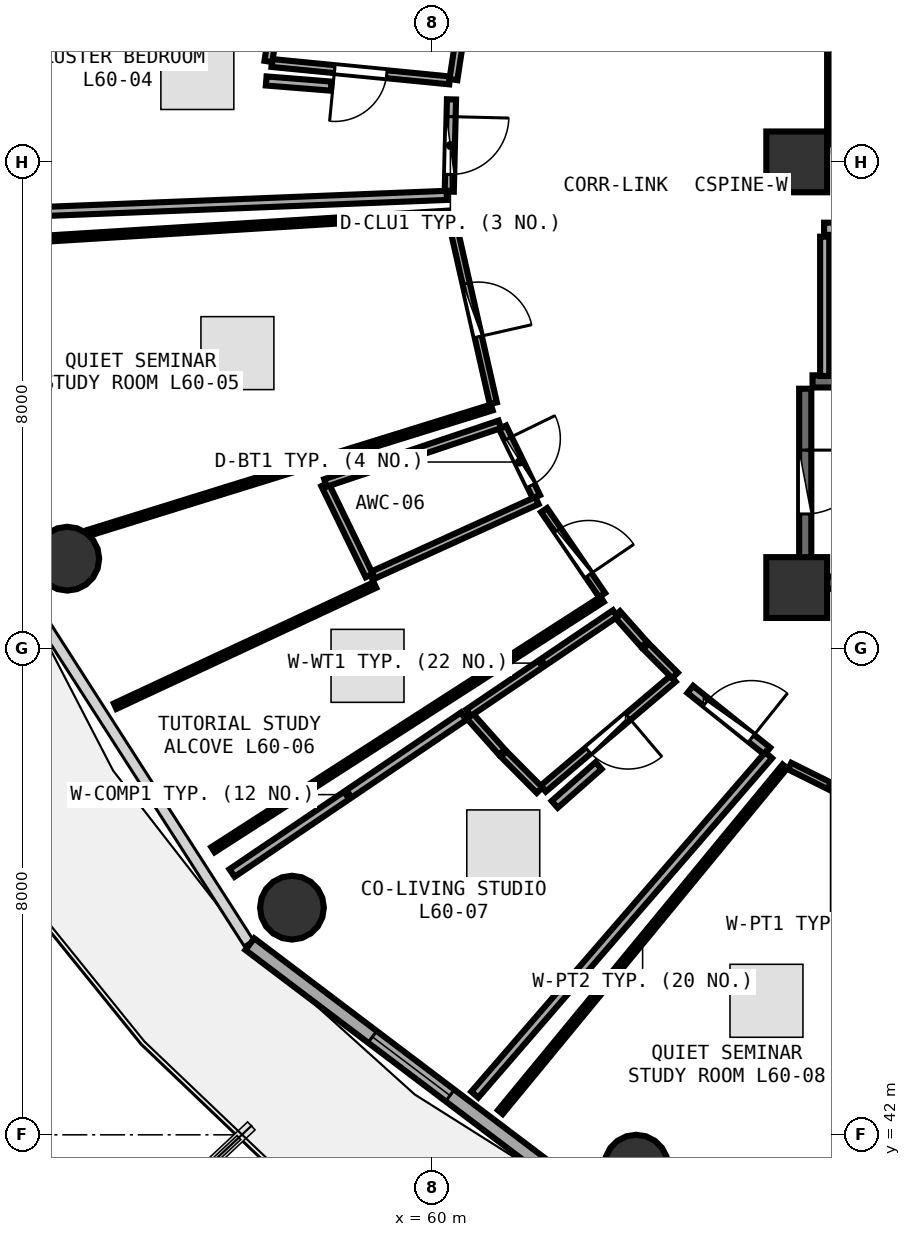
"""IFC4 building model, lengths in metres.
Left out: names, types, materials, properties, quantities, classifications, styles, units other than length and angle.
Written with IfcOpenShell. Run it as: python <this file> out.ifc"""

import sys

from ifc_helpers import new_model, si_unit, direction, frame, frame_2d, origin, origin_2d, place, context, subcontext, project, spatial, rectangle, circle, extrude, element, fill, save


model = new_model("IFC4")
c1 = context("Model", 3, precision=1e-05, world=origin(), true_north=direction((0.0, 1.0)))
c2 = subcontext(c1, "Body", "Model", "MODEL_VIEW")
j1 = project(units=[si_unit("LENGTHUNIT", "METRE"), si_unit("PLANEANGLEUNIT", "RADIAN")], contexts=[c1])
p1 = place(None, origin())
s1 = spatial("IfcSite", under=j1, at=p1, CompositionType="ELEMENT")
p2 = place(p1, origin())
s2 = spatial("IfcBuilding", under=s1, at=p2, CompositionType="ELEMENT")
p3 = place(p2, frame((0.0, 0.0, 234.45)))
s3 = spatial("IfcBuildingStorey", under=s2, at=p3, CompositionType="ELEMENT", Elevation=234.45)
for number, where, z_axis, x_axis in (
    (1, (66.0, 51.0, 0.0), (0.0, 0.0, 1.0), (1.0, 0.0, 0.0)),
    (2, (66.0, 58.0, 0.0), (0.0, 0.0, 1.0), (1.0, 0.0, 0.0)),
):
    element("IfcColumn", number, at=place(p3, frame(where, z_axis=z_axis, x_axis=x_axis)), inside=s3, PredefinedType="PILASTER", context=c2, shape_type="SweptSolid", body=[
        extrude(rectangle(XDim=1.0, YDim=1.0, at=origin_2d()), origin(), (0.0, 0.0, 1.0), 3.75),
    ])
for number, where, z_axis, x_axis in (
    (3, (54.003, 51.474, 0.0), (0.0, 0.0, 1.0), (1.0, 0.0, 0.0)),
    (4, (57.698, 45.736, 0.0), (0.0, 0.0, 1.0), (1.0, 0.0, 0.0)),
    (5, (63.36, 41.476, 0.0), (0.0, 0.0, 1.0), (1.0, 0.0, 0.0)),
):
    element("IfcColumn", number, at=place(p3, frame(where, z_axis=z_axis, x_axis=x_axis)), inside=s3, PredefinedType="COLUMN", context=c2, shape_type="SweptSolid", body=[
        extrude(circle(Radius=0.525, at=origin_2d()), origin(), (0.0, 0.0, 1.0), 3.75),
    ])
p4 = place(p3, frame((57.006, 45.135, 0.0), z_axis=(0.0, 0.0, 1.0), x_axis=(0.797701674595, -0.603052268338, 0.0)))
e6 = element("IfcWall", 6, at=p4, inside=s3, PredefinedType="SOLIDWALL", context=c2, shape_type="SweptSolid", body=[
    extrude(rectangle(XDim=7.374, YDim=0.24, at=frame_2d((3.687, 0.0))), origin(), (0.0, 0.0, 1.0), 3.475),
])
p5 = place(p4, frame((2.527, 0.0, 0.85)))
e7 = element("IfcOpeningElement", 7, at=p5, cuts=e6, PredefinedType="OPENING", context=c2, shape_type="SweptSolid", body=[
    extrude(rectangle(XDim=1.6, YDim=1.45, at=frame_2d((0.8, 0.725))), frame((0.0, 0.13, 0.0), z_axis=(0.0, -1.0, 0.0), x_axis=(1.0, 0.0, 0.0)), (0.0, 0.0, 1.0), 0.26),
])
for number, where, z_axis, x_axis in (
    (8, (66.26, 51.08, 0.0), (0.0, 0.0, 1.0), (1.0, 0.0, 0.0)),
    (9, (73.42, 54.39, 0.0), (0.0, 0.0, 1.0), (-1.0, 0.0, 0.0)),
):
    element("IfcWall", number, at=place(p3, frame(where, z_axis=z_axis, x_axis=x_axis)), inside=s3, PredefinedType="SHEAR", context=c2, shape_type="SweptSolid", body=[
        extrude(rectangle(XDim=7.16, YDim=0.2, at=frame_2d((3.58, 0.0))), origin(), (0.0, 0.0, 1.0), 3.49),
    ])
p6 = place(p3, frame((66.14, 54.27, 0.0), z_axis=(0.0, 0.0, 1.0), x_axis=(0.0, -1.0, 0.0)))
e10 = element("IfcWall", 10, at=p6, inside=s3, PredefinedType="SHEAR", context=c2, shape_type="SweptSolid", body=[
    extrude(rectangle(XDim=3.07, YDim=0.2, at=frame_2d((1.535, 0.0))), origin(), (0.0, 0.0, 1.0), 3.49),
])
p7 = place(p6, frame((1.01, 0.0, 0.0)))
e11 = element("IfcOpeningElement", 11, at=p7, cuts=e10, PredefinedType="OPENING", context=c2, shape_type="SweptSolid", body=[
    extrude(rectangle(XDim=1.05, YDim=2.1, at=frame_2d((0.525, 1.05))), frame((0.0, 0.11, 0.0), z_axis=(0.0, -1.0, 0.0), x_axis=(1.0, 0.0, 0.0)), (0.0, 0.0, 1.0), 0.22),
])
p8 = place(p3, frame((66.45, 56.9, 0.0), z_axis=(0.0, 0.0, 1.0), x_axis=(1.0, 0.0, 0.0)))
e12 = element("IfcWall", 12, at=p8, inside=s3, PredefinedType="SOLIDWALL", context=c2, shape_type="SweptSolid", body=[
    extrude(rectangle(XDim=14.4, YDim=0.2, at=frame_2d((7.2, 0.0))), origin(), (0.0, 0.0, 1.0), 3.48),
])
p9 = place(p8, frame((0.4, 0.0, 0.0)))
e13 = element("IfcOpeningElement", 13, at=p9, cuts=e12, PredefinedType="OPENING", context=c2, shape_type="SweptSolid", body=[
    extrude(rectangle(XDim=1.1, YDim=2.1, at=frame_2d((0.55, 1.05))), frame((0.0, 0.11, 0.0), z_axis=(0.0, -1.0, 0.0), x_axis=(1.0, 0.0, 0.0)), (0.0, 0.0, 1.0), 0.22),
])
p10 = place(p8, frame((2.4, 0.0, 0.0)))
e14 = element("IfcOpeningElement", 14, at=p10, cuts=e12, PredefinedType="OPENING", context=c2, shape_type="SweptSolid", body=[
    extrude(rectangle(XDim=1.1, YDim=2.1, at=frame_2d((0.55, 1.05))), frame((0.0, 0.11, 0.0), z_axis=(0.0, -1.0, 0.0), x_axis=(1.0, 0.0, 0.0)), (0.0, 0.0, 1.0), 0.22),
])
p11 = place(p8, frame((4.4, 0.0, 0.0)))
e15 = element("IfcOpeningElement", 15, at=p11, cuts=e12, PredefinedType="OPENING", context=c2, shape_type="SweptSolid", body=[
    extrude(rectangle(XDim=1.1, YDim=2.1, at=frame_2d((0.55, 1.05))), frame((0.0, 0.11, 0.0), z_axis=(0.0, -1.0, 0.0), x_axis=(1.0, 0.0, 0.0)), (0.0, 0.0, 1.0), 0.22),
])
p12 = place(p3, frame((66.46, 54.48, 0.0), z_axis=(0.0, 0.0, 1.0), x_axis=(0.0, 1.0, 0.0)))
e16 = element("IfcWall", 16, at=p12, inside=s3, PredefinedType="PARTITIONING", context=c2, shape_type="SweptSolid", body=[
    extrude(rectangle(XDim=2.29, YDim=0.15, at=frame_2d((1.145, 0.0))), origin(), (0.0, 0.0, 1.0), 3.48),
])
p13 = place(p3, frame((60.291, 59.34, 0.0), z_axis=(0.0, 0.0, 1.0), x_axis=(-0.995236750248, 0.097487491277, 0.0)))
e17 = element("IfcWall", 17, at=p13, inside=s3, PredefinedType="PLUMBINGWALL", context=c2, shape_type="SweptSolid", body=[
    extrude(rectangle(XDim=2.938, YDim=0.13, at=frame_2d((1.469, 0.0))), origin(), (0.0, 0.0, 1.0), 3.175),
])
p14 = place(p13, frame((1.039, 0.0, 0.0)))
e18 = element("IfcOpeningElement", 18, at=p14, cuts=e17, PredefinedType="OPENING", context=c2, shape_type="SweptSolid", body=[
    extrude(rectangle(XDim=0.86, YDim=2.05, at=frame_2d((0.43, 1.025))), frame((0.0, 0.075, 0.0), z_axis=(0.0, -1.0, 0.0), x_axis=(1.0, 0.0, 0.0)), (0.0, 0.0, 1.0), 0.15),
])
p15 = place(p3, frame((60.323, 59.028, 0.0), z_axis=(0.0, 0.0, 1.0), x_axis=(-0.024453580127, -0.999700966499, 0.0)))
e19 = element("IfcWall", 19, at=p15, inside=s3, PredefinedType="PARTITIONING", context=c2, shape_type="SweptSolid", body=[
    extrude(rectangle(XDim=1.518, YDim=0.15, at=frame_2d((0.759, 0.0))), origin(), (0.0, 0.0, 1.0), 3.025),
])
p16 = place(p15, frame((0.284, 0.0, 0.0)))
e20 = element("IfcOpeningElement", 20, at=p16, cuts=e19, PredefinedType="OPENING", context=c2, shape_type="SweptSolid", body=[
    extrude(rectangle(XDim=0.95, YDim=2.08, at=frame_2d((0.475, 1.04))), frame((0.0, 0.085, 0.0), z_axis=(0.0, -1.0, 0.0), x_axis=(1.0, 0.0, 0.0)), (0.0, 0.0, 1.0), 0.17),
])
p17 = place(p3, frame((60.316, 57.093, 0.0), z_axis=(0.0, 0.0, 1.0), x_axis=(0.22091500264, -0.975293064473, 0.0)))
e21 = element("IfcWall", 21, at=p17, inside=s3, PredefinedType="PARTITIONING", context=c2, shape_type="SweptSolid", body=[
    extrude(rectangle(XDim=3.139, YDim=0.12, at=frame_2d((1.569, 0.0))), origin(), (0.0, 0.0, 1.0), 3.48),
])
p18 = place(p17, frame((1.119, 0.0, 0.0)))
e22 = element("IfcOpeningElement", 22, at=p18, cuts=e21, PredefinedType="OPENING", context=c2, shape_type="SweptSolid", body=[
    extrude(rectangle(XDim=0.9, YDim=2.08, at=frame_2d((0.45, 1.04))), frame((0.0, 0.07, 0.0), z_axis=(0.0, -1.0, 0.0), x_axis=(1.0, 0.0, 0.0)), (0.0, 0.0, 1.0), 0.14),
])
p19 = place(p3, frame((61.162, 53.636, 0.0), z_axis=(0.0, 0.0, 1.0), x_axis=(0.437981349822, -0.898984058373, 0.0)))
e23 = element("IfcWall", 23, at=p19, inside=s3, PredefinedType="PLUMBINGWALL", context=c2, shape_type="SweptSolid", body=[
    extrude(rectangle(XDim=1.273, YDim=0.13, at=frame_2d((0.636, 0.0))), origin(), (0.0, 0.0, 1.0), 3.235),
])
p20 = place(p19, frame((0.206, 0.0, 0.0)))
e24 = element("IfcOpeningElement", 24, at=p20, cuts=e23, PredefinedType="OPENING", context=c2, shape_type="SweptSolid", body=[
    extrude(rectangle(XDim=0.86, YDim=2.05, at=frame_2d((0.43, 1.025))), frame((0.0, 0.075, 0.0), z_axis=(0.0, -1.0, 0.0), x_axis=(1.0, 0.0, 0.0)), (0.0, 0.0, 1.0), 0.15),
])
p21 = place(p3, frame((61.846, 52.273, 0.0), z_axis=(0.0, 0.0, 1.0), x_axis=(0.563860796601, -0.825869845712, 0.0)))
e25 = element("IfcWall", 25, at=p21, inside=s3, PredefinedType="PARTITIONING", context=c2, shape_type="SweptSolid", body=[
    extrude(rectangle(XDim=1.691, YDim=0.12, at=frame_2d((0.846, 0.0))), origin(), (0.0, 0.0, 1.0), 3.025),
])
p22 = place(p21, frame((0.396, 0.0, 0.0)))
e26 = element("IfcOpeningElement", 26, at=p22, cuts=e25, PredefinedType="OPENING", context=c2, shape_type="SweptSolid", body=[
    extrude(rectangle(XDim=0.9, YDim=2.08, at=frame_2d((0.45, 1.04))), frame((0.0, 0.07, 0.0), z_axis=(0.0, -1.0, 0.0), x_axis=(1.0, 0.0, 0.0)), (0.0, 0.0, 1.0), 0.14),
])
p23 = place(p3, frame((63.966, 49.501, 0.0), z_axis=(0.0, 0.0, 1.0), x_axis=(-0.763141339825, -0.646231611305, 0.0)))
e27 = element("IfcWall", 27, at=p23, inside=s3, PredefinedType="PLUMBINGWALL", context=c2, shape_type="SweptSolid", body=[
    extrude(rectangle(XDim=2.798, YDim=0.13, at=frame_2d((1.399, 0.0))), origin(), (0.0, 0.0, 1.0), 3.025),
])
p24 = place(p23, frame((0.969, 0.0, 0.0)))
e28 = element("IfcOpeningElement", 28, at=p24, cuts=e27, PredefinedType="OPENING", context=c2, shape_type="SweptSolid", body=[
    extrude(rectangle(XDim=0.86, YDim=2.05, at=frame_2d((0.43, 1.025))), frame((0.0, 0.075, 0.0), z_axis=(0.0, -1.0, 0.0), x_axis=(1.0, 0.0, 0.0)), (0.0, 0.0, 1.0), 0.15),
])
p25 = place(p3, frame((64.25, 49.324, 0.0), z_axis=(0.0, 0.0, 1.0), x_axis=(0.780560643324, -0.625080060547, 0.0)))
e29 = element("IfcWall", 29, at=p25, inside=s3, PredefinedType="PARTITIONING", context=c2, shape_type="SweptSolid", body=[
    extrude(rectangle(XDim=1.624, YDim=0.15, at=frame_2d((0.812, 0.0))), origin(), (0.0, 0.0, 1.0), 3.025),
])
p26 = place(p25, frame((0.337, 0.0, 0.0)))
e30 = element("IfcOpeningElement", 30, at=p26, cuts=e29, PredefinedType="OPENING", context=c2, shape_type="SweptSolid", body=[
    extrude(rectangle(XDim=0.95, YDim=2.08, at=frame_2d((0.475, 1.04))), frame((0.0, 0.085, 0.0), z_axis=(0.0, -1.0, 0.0), x_axis=(1.0, 0.0, 0.0)), (0.0, 0.0, 1.0), 0.17),
])
p27 = place(p3, frame((65.885, 48.063, 0.0), z_axis=(0.0, 0.0, 1.0), x_axis=(0.895499293581, -0.445062933973, 0.0)))
e31 = element("IfcWall", 31, at=p27, inside=s3, PredefinedType="PARTITIONING", context=c2, shape_type="SweptSolid", body=[
    extrude(rectangle(XDim=3.408, YDim=0.12, at=frame_2d((1.704, 0.0))), origin(), (0.0, 0.0, 1.0), 3.235),
])
p28 = place(p27, frame((1.254, 0.0, 0.0)))
e32 = element("IfcOpeningElement", 32, at=p28, cuts=e31, PredefinedType="OPENING", context=c2, shape_type="SweptSolid", body=[
    extrude(rectangle(XDim=0.9, YDim=2.08, at=frame_2d((0.45, 1.04))), frame((0.0, 0.07, 0.0), z_axis=(0.0, -1.0, 0.0), x_axis=(1.0, 0.0, 0.0)), (0.0, 0.0, 1.0), 0.14),
])
p29 = place(p3, frame((66.55, 60.68, 0.0), z_axis=(0.0, 0.0, 1.0), x_axis=(0.0, -1.0, 0.0)))
e33 = element("IfcWall", 33, at=p29, inside=s3, PredefinedType="PARTITIONING", context=c2, shape_type="SweptSolid", body=[
    extrude(rectangle(XDim=2.39, YDim=0.1, at=frame_2d((1.195, 0.0))), origin(), (0.0, 0.0, 1.0), 3.48),
])
p30 = place(p3, frame((60.451, 59.991, 0.0), z_axis=(0.0, 0.0, 1.0), x_axis=(-0.150321319766, -0.988637193729, 0.0)))
e34 = element("IfcWall", 34, at=p30, inside=s3, PredefinedType="PLUMBINGWALL", context=c2, shape_type="SweptSolid", body=[
    extrude(rectangle(XDim=0.645, YDim=0.13, at=frame_2d((0.322, 0.0))), origin(), (0.0, 0.0, 1.0), 3.48),
])
p31 = place(p3, frame((57.311, 59.652, 0.0), z_axis=(0.0, 0.0, 1.0), x_axis=(0.150331405734, 0.988635660114, 0.0)))
e35 = element("IfcWall", 35, at=p31, inside=s3, PredefinedType="PLUMBINGWALL", context=c2, shape_type="SweptSolid", body=[
    extrude(rectangle(XDim=0.797, YDim=0.13, at=frame_2d((0.399, 0.0))), origin(), (0.0, 0.0, 1.0), 3.48),
])
p32 = place(p3, frame((60.244, 57.449, 0.0), z_axis=(0.0, 0.0, 1.0), x_axis=(-0.999198776547, -0.040022555479, 0.0)))
e36 = element("IfcWall", 36, at=p32, inside=s3, PredefinedType="PARTITIONING", context=c2, shape_type="SweptSolid", body=[
    extrude(rectangle(XDim=7.869, YDim=0.15, at=frame_2d((3.935, 0.0))), origin(), (0.0, 0.0, 1.0), 3.075),
])
p33 = place(p3, frame((57.275, 59.331, 0.0), z_axis=(0.0, 0.0, 1.0), x_axis=(0.996837682514, -0.079464675924, 0.0)))
e37 = element("IfcWall", 37, at=p33, inside=s3, PredefinedType="PARTITIONING", context=c2, shape_type="SweptSolid", body=[
    extrude(rectangle(XDim=1.072, YDim=0.15, at=frame_2d((0.536, 0.0))), origin(), (0.0, 0.0, 1.0), 3.175),
])
p34 = place(p3, frame((60.985, 53.961, 0.0), z_axis=(0.0, 0.0, 1.0), x_axis=(-0.954952218503, -0.29675960031, 0.0)))
e38 = element("IfcWall", 38, at=p34, inside=s3, PredefinedType="PARTITIONING", context=c2, shape_type="SweptSolid", body=[
    extrude(rectangle(XDim=6.946, YDim=0.1, at=frame_2d((3.473, 0.0))), origin(), (0.0, 0.0, 1.0), 3.175),
])
p35 = place(p3, frame((52.411, 56.66, 0.0), z_axis=(0.0, 0.0, 1.0), x_axis=(0.998074132124, 0.06203246557, 0.0)))
e39 = element("IfcWall", 39, at=p35, inside=s3, PredefinedType="PARTITIONING", context=c2, shape_type="SweptSolid", body=[
    extrude(rectangle(XDim=7.867, YDim=0.1, at=frame_2d((3.934, 0.0))), origin(), (0.0, 0.0, 1.0), 3.075),
])
p36 = place(p3, frame((61.728, 52.43, 0.0), z_axis=(0.0, 0.0, 1.0), x_axis=(-0.910394340166, -0.413741640874, 0.0)))
e40 = element("IfcWall", 40, at=p36, inside=s3, PredefinedType="PLUMBINGWALL", context=c2, shape_type="SweptSolid", body=[
    extrude(rectangle(XDim=3.0, YDim=0.13, at=frame_2d((1.5, 0.0))), origin(), (0.0, 0.0, 1.0), 3.025),
])
p37 = place(p3, frame((58.969, 51.198, 0.0), z_axis=(0.0, 0.0, 1.0), x_axis=(-0.437811526414, 0.899066775795, 0.0)))
e41 = element("IfcWall", 41, at=p37, inside=s3, PredefinedType="PLUMBINGWALL", context=c2, shape_type="SweptSolid", body=[
    extrude(rectangle(XDim=1.666, YDim=0.13, at=frame_2d((0.833, 0.0))), origin(), (0.0, 0.0, 1.0), 3.025),
])
p38 = place(p3, frame((58.25, 52.72, 0.0), z_axis=(0.0, 0.0, 1.0), x_axis=(0.947938024122, 0.318454867169, 0.0)))
e42 = element("IfcWall", 42, at=p38, inside=s3, PredefinedType="PLUMBINGWALL", context=c2, shape_type="SweptSolid", body=[
    extrude(rectangle(XDim=3.024, YDim=0.13, at=frame_2d((1.512, 0.0))), origin(), (0.0, 0.0, 1.0), 3.175),
])
p39 = place(p3, frame((62.799, 50.805, 0.0), z_axis=(0.0, 0.0, 1.0), x_axis=(-0.841021030646, -0.541002426992, 0.0)))
e43 = element("IfcWall", 43, at=p39, inside=s3, PredefinedType="PARTITIONING", context=c2, shape_type="SweptSolid", body=[
    extrude(rectangle(XDim=7.609, YDim=0.1, at=frame_2d((3.805, 0.0))), origin(), (0.0, 0.0, 1.0), 3.075),
])
p40 = place(p3, frame((54.79, 49.049, 0.0), z_axis=(0.0, 0.0, 1.0), x_axis=(0.906304818196, 0.422624628381, 0.0)))
e44 = element("IfcWall", 44, at=p40, inside=s3, PredefinedType="PARTITIONING", context=c2, shape_type="SweptSolid", body=[
    extrude(rectangle(XDim=4.714, YDim=0.1, at=frame_2d((2.357, 0.0))), origin(), (0.0, 0.0, 1.0), 3.075),
])
p41 = place(p3, frame((63.044, 50.569, 0.0), z_axis=(0.0, 0.0, 1.0), x_axis=(0.663846659507, -0.74786871352, 0.0)))
e45 = element("IfcWall", 45, at=p41, inside=s3, PredefinedType="PLUMBINGWALL", context=c2, shape_type="SweptSolid", body=[
    extrude(rectangle(XDim=0.674, YDim=0.13, at=frame_2d((0.337, 0.0))), origin(), (0.0, 0.0, 1.0), 3.48),
])
p42 = place(p3, frame((63.519, 50.036, 0.0), z_axis=(0.0, 0.0, 1.0), x_axis=(0.704946592253, -0.70926039088, 0.0)))
e46 = element("IfcWall", 46, at=p42, inside=s3, PredefinedType="PLUMBINGWALL", context=c2, shape_type="SweptSolid", body=[
    extrude(rectangle(XDim=0.679, YDim=0.13, at=frame_2d((0.34, 0.0))), origin(), (0.0, 0.0, 1.0), 3.025),
])
p43 = place(p3, frame((61.771, 47.668, 0.0), z_axis=(0.0, 0.0, 1.0), x_axis=(-0.704918740806, 0.709288071844, 0.0)))
e47 = element("IfcWall", 47, at=p43, inside=s3, PredefinedType="PLUMBINGWALL", context=c2, shape_type="SweptSolid", body=[
    extrude(rectangle(XDim=0.838, YDim=0.13, at=frame_2d((0.419, 0.0))), origin(), (0.0, 0.0, 1.0), 3.025),
])
p44 = place(p3, frame((61.153, 48.292, 0.0), z_axis=(0.0, 0.0, 1.0), x_axis=(-0.663963631636, 0.747764866696, 0.0)))
e48 = element("IfcWall", 48, at=p44, inside=s3, PredefinedType="PLUMBINGWALL", context=c2, shape_type="SweptSolid", body=[
    extrude(rectangle(XDim=0.833, YDim=0.13, at=frame_2d((0.417, 0.0))), origin(), (0.0, 0.0, 1.0), 3.48),
])
p45 = place(p3, frame((60.603, 48.941, 0.0), z_axis=(0.0, 0.0, 1.0), x_axis=(0.828277690913, 0.560317826538, 0.0)))
e49 = element("IfcWall", 49, at=p45, inside=s3, PredefinedType="PLUMBINGWALL", context=c2, shape_type="SweptSolid", body=[
    extrude(rectangle(XDim=2.912, YDim=0.13, at=frame_2d((1.456, 0.0))), origin(), (0.0, 0.0, 1.0), 3.235),
])
p46 = place(p3, frame((65.538, 48.242, 0.0), z_axis=(0.0, 0.0, 1.0), x_axis=(-0.654642167947, -0.755938907549, 0.0)))
e50 = element("IfcWall", 50, at=p46, inside=s3, PredefinedType="PARTITIONING", context=c2, shape_type="SweptSolid", body=[
    extrude(rectangle(XDim=7.382, YDim=0.15, at=frame_2d((3.691, 0.0))), origin(), (0.0, 0.0, 1.0), 3.025),
])
p47 = place(p3, frame((56.713, 46.305, 0.0), z_axis=(0.0, 0.0, 1.0), x_axis=(0.828059419786, 0.560640345768, 0.0)))
e51 = element("IfcWall", 51, at=p47, inside=s3, PredefinedType="PARTITIONING", context=c2, shape_type="SweptSolid", body=[
    extrude(rectangle(XDim=4.599, YDim=0.15, at=frame_2d((2.299, 0.0))), origin(), (0.0, 0.0, 1.0), 3.075),
])
p48 = place(p3, frame((62.02, 47.435, 0.0), z_axis=(0.0, 0.0, 1.0), x_axis=(0.749645272156, 0.661839834049, 0.0)))
e52 = element("IfcWall", 52, at=p48, inside=s3, PredefinedType="PARTITIONING", context=c2, shape_type="SweptSolid", body=[
    extrude(rectangle(XDim=0.962, YDim=0.15, at=frame_2d((0.481, 0.0))), origin(), (0.0, 0.0, 1.0), 3.48),
])
p49 = place(p3, frame((68.974, 46.483, 0.0), z_axis=(0.0, 0.0, 1.0), x_axis=(-0.399504113712, -0.916731401844, 0.0)))
e53 = element("IfcWall", 53, at=p49, inside=s3, PredefinedType="PARTITIONING", context=c2, shape_type="SweptSolid", body=[
    extrude(rectangle(XDim=7.182, YDim=0.1, at=frame_2d((3.591, 0.0))), origin(), (0.0, 0.0, 1.0), 3.075),
])
p50 = place(p3, frame((61.125, 42.374, 0.0), z_axis=(0.0, 0.0, 1.0), x_axis=(0.635558493253, 0.772052719478, 0.0)))
e54 = element("IfcWall", 54, at=p50, inside=s3, PredefinedType="PARTITIONING", context=c2, shape_type="SweptSolid", body=[
    extrude(rectangle(XDim=7.364, YDim=0.1, at=frame_2d((3.682, 0.0))), origin(), (0.0, 0.0, 1.0), 3.025),
])
p51 = place(p5, origin())
e55 = element("IfcWindow", 55, at=p51, inside=s3, PartitioningType="SINGLE_PANEL", PredefinedType="WINDOW", context=c2, shape_type="SweptSolid", body=[
    extrude(rectangle(XDim=1.6, YDim=1.45, at=frame_2d((0.8, 0.725))), frame((0.0, 0.03, 0.0), z_axis=(0.0, -1.0, 0.0), x_axis=(1.0, 0.0, 0.0)), (0.0, 0.0, 1.0), 0.06),
])
fill(e7, e55)
p52 = place(p7, origin())
e56 = element("IfcDoor", 56, at=p52, inside=s3, OperationType="SINGLE_SWING_LEFT", PredefinedType="DOOR", context=c2, shape_type="SweptSolid", body=[
    extrude(rectangle(XDim=1.05, YDim=2.1, at=frame_2d((0.525, 1.05))), frame((0.0, 0.025, 0.0), z_axis=(0.0, -1.0, 0.0), x_axis=(1.0, 0.0, 0.0)), (0.0, 0.0, 1.0), 0.05),
])
fill(e11, e56)
p53 = place(p14, origin())
e57 = element("IfcDoor", 57, at=p53, inside=s3, OperationType="SINGLE_SWING_RIGHT", PredefinedType="DOOR", context=c2, shape_type="SweptSolid", body=[
    extrude(rectangle(XDim=0.86, YDim=2.05, at=frame_2d((0.43, 1.025))), frame((0.0, 0.025, 0.0), z_axis=(0.0, -1.0, 0.0), x_axis=(1.0, 0.0, 0.0)), (0.0, 0.0, 1.0), 0.05),
])
fill(e18, e57)
p54 = place(p16, origin())
e58 = element("IfcDoor", 58, at=p54, inside=s3, OperationType="SINGLE_SWING_LEFT", PredefinedType="DOOR", context=c2, shape_type="SweptSolid", body=[
    extrude(rectangle(XDim=0.95, YDim=2.08, at=frame_2d((0.475, 1.04))), frame((0.0, 0.025, 0.0), z_axis=(0.0, -1.0, 0.0), x_axis=(1.0, 0.0, 0.0)), (0.0, 0.0, 1.0), 0.05),
])
fill(e20, e58)
p55 = place(p18, origin())
e59 = element("IfcDoor", 59, at=p55, inside=s3, OperationType="SINGLE_SWING_RIGHT", PredefinedType="DOOR", context=c2, shape_type="SweptSolid", body=[
    extrude(rectangle(XDim=0.9, YDim=2.08, at=frame_2d((0.45, 1.04))), frame((0.0, 0.025, 0.0), z_axis=(0.0, -1.0, 0.0), x_axis=(1.0, 0.0, 0.0)), (0.0, 0.0, 1.0), 0.05),
])
fill(e22, e59)
p56 = place(p20, origin())
e60 = element("IfcDoor", 60, at=p56, inside=s3, OperationType="SINGLE_SWING_LEFT", PredefinedType="DOOR", context=c2, shape_type="SweptSolid", body=[
    extrude(rectangle(XDim=0.86, YDim=2.05, at=frame_2d((0.43, 1.025))), frame((0.0, 0.025, 0.0), z_axis=(0.0, -1.0, 0.0), x_axis=(1.0, 0.0, 0.0)), (0.0, 0.0, 1.0), 0.05),
])
fill(e24, e60)
p57 = place(p22, origin())
e61 = element("IfcDoor", 61, at=p57, inside=s3, OperationType="SINGLE_SWING_RIGHT", PredefinedType="DOOR", context=c2, shape_type="SweptSolid", body=[
    extrude(rectangle(XDim=0.9, YDim=2.08, at=frame_2d((0.45, 1.04))), frame((0.0, 0.025, 0.0), z_axis=(0.0, -1.0, 0.0), x_axis=(1.0, 0.0, 0.0)), (0.0, 0.0, 1.0), 0.05),
])
fill(e26, e61)
p58 = place(p24, origin())
e62 = element("IfcDoor", 62, at=p58, inside=s3, OperationType="SINGLE_SWING_LEFT", PredefinedType="DOOR", context=c2, shape_type="SweptSolid", body=[
    extrude(rectangle(XDim=0.86, YDim=2.05, at=frame_2d((0.43, 1.025))), frame((0.0, 0.025, 0.0), z_axis=(0.0, -1.0, 0.0), x_axis=(1.0, 0.0, 0.0)), (0.0, 0.0, 1.0), 0.05),
])
fill(e28, e62)
p59 = place(p26, origin())
e63 = element("IfcDoor", 63, at=p59, inside=s3, OperationType="SINGLE_SWING_RIGHT", PredefinedType="DOOR", context=c2, shape_type="SweptSolid", body=[
    extrude(rectangle(XDim=0.95, YDim=2.08, at=frame_2d((0.475, 1.04))), frame((0.0, 0.025, 0.0), z_axis=(0.0, -1.0, 0.0), x_axis=(1.0, 0.0, 0.0)), (0.0, 0.0, 1.0), 0.05),
])
fill(e30, e63)
save(model, sys.argv[1])
